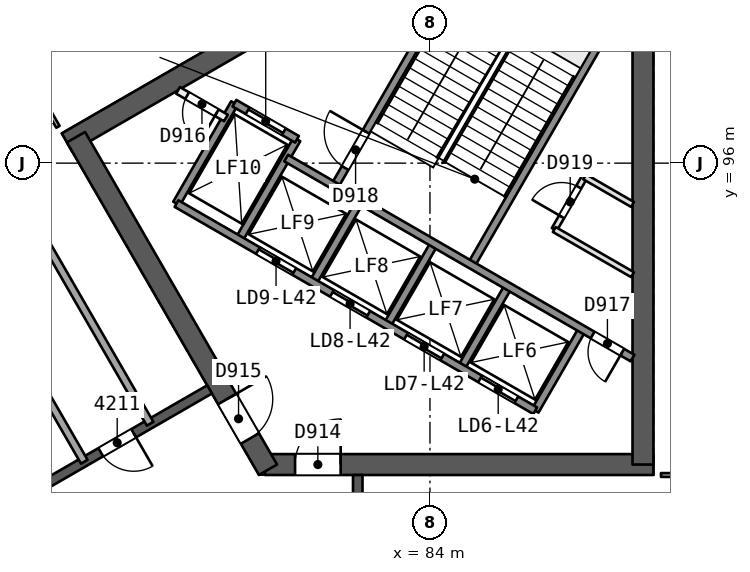
"""IFC4 building model, lengths in metres.
Left out: names, types, materials, properties, quantities, classifications, styles, units other than length and angle.
Written with IfcOpenShell. Run it as: python <this file> out.ifc"""

import sys

from ifc_helpers import new_model, si_unit, direction, frame, frame_2d, origin, place, context, subcontext, project, spatial, rectangle, extrude, element, fill, save


model = new_model("IFC4")
c1 = context("Model", 3, precision=1e-05, world=origin(), true_north=direction((0.0, 1.0)))
c2 = subcontext(c1, "Body", "Model", "MODEL_VIEW")
j1 = project(units=[si_unit("LENGTHUNIT", "METRE"), si_unit("PLANEANGLEUNIT", "RADIAN")], contexts=[c1])
p1 = place(None, origin())
s1 = spatial("IfcSite", under=j1, at=p1, CompositionType="ELEMENT")
p2 = place(p1, origin())
s2 = spatial("IfcBuilding", under=s1, at=p2, CompositionType="ELEMENT")
p3 = place(p2, frame((0.0, 0.0, 174.8)))
s3 = spatial("IfcBuildingStorey", under=s2, at=p3, CompositionType="ELEMENT", Elevation=174.8)
p4 = place(p3, frame((79.659, 88.069, 0.0), z_axis=(0.0, 0.0, 1.0), x_axis=(1.0, 0.0, 0.0)))
e1 = element("IfcWall", 1, at=p4, inside=s3, PredefinedType="SHEAR", context=c2, shape_type="SweptSolid", body=[
    extrude(rectangle(XDim=10.221, YDim=0.55, at=frame_2d((5.111, 0.0))), origin(), (0.0, 0.0, 1.0), 3.7),
])
p5 = place(p4, frame((0.791, 0.0, 0.0)))
e2 = element("IfcOpeningElement", 2, at=p5, cuts=e1, PredefinedType="OPENING", context=c2, shape_type="SweptSolid", body=[
    extrude(rectangle(XDim=1.2, YDim=2.1, at=frame_2d((0.6, 1.05))), frame((0.0, 0.286, 0.0), z_axis=(0.0, -1.0, 0.0), x_axis=(1.0, 0.0, 0.0)), (0.0, 0.0, 1.0), 0.571),
])
p6 = place(p3, frame((89.605, 88.069, 0.0), z_axis=(0.0, 0.0, 1.0), x_axis=(0.0, 1.0, 0.0)))
e3 = element("IfcWall", 3, at=p6, inside=s3, PredefinedType="SHEAR", context=c2, shape_type="SweptSolid", body=[
    extrude(rectangle(XDim=14.058, YDim=0.55, at=frame_2d((7.029, 0.0))), origin(), (0.0, 0.0, 1.0), 3.7),
])
p7 = place(p3, frame((86.723, 103.633, 0.0), z_axis=(0.0, 0.0, 1.0), x_axis=(-0.866023530946, -0.500003243837, 0.0)))
e4 = element("IfcWall", 4, at=p7, inside=s3, PredefinedType="SHEAR", context=c2, shape_type="SweptSolid", body=[
    extrude(rectangle(XDim=14.175, YDim=0.55, at=frame_2d((7.087, 0.0))), origin(), (0.0, 0.0, 1.0), 3.7),
])
p8 = place(p3, frame((74.686, 96.683, 0.0), z_axis=(0.0, 0.0, 1.0), x_axis=(0.499997818338, -0.866026663364, 0.0)))
e5 = element("IfcWall", 5, at=p8, inside=s3, PredefinedType="SHEAR", context=c2, shape_type="SweptSolid", body=[
    extrude(rectangle(XDim=10.105, YDim=0.55, at=frame_2d((5.052, 0.0))), origin(), (0.0, 0.0, 1.0), 3.7),
])
p9 = place(p8, frame((7.955, 0.0, 0.0)))
e6 = element("IfcOpeningElement", 6, at=p9, cuts=e5, PredefinedType="OPENING", context=c2, shape_type="SweptSolid", body=[
    extrude(rectangle(XDim=1.2, YDim=2.1, at=frame_2d((0.6, 1.05))), frame((0.0, 0.286, 0.0), z_axis=(0.0, -1.0, 0.0), x_axis=(1.0, 0.0, 0.0)), (0.0, 0.0, 1.0), 0.571),
])
p10 = place(p3, frame((82.1, 72.206, 0.0), z_axis=(0.0, 0.0, 1.0), x_axis=(0.0, 1.0, 0.0)))
e7 = element("IfcWall", 7, at=p10, inside=s3, PredefinedType="SHEAR", context=c2, shape_type="SweptSolid", body=[
    extrude(rectangle(XDim=15.588, YDim=0.25, at=frame_2d((7.794, 0.0))), origin(), (0.0, 0.0, 1.0), 3.25),
])
p11 = place(p10, frame((1.682, 0.0, 0.0)))
e8 = element("IfcOpeningElement", 8, at=p11, cuts=e7, PredefinedType="OPENING", context=c2, shape_type="SweptSolid", body=[
    extrude(rectangle(XDim=1.0, YDim=2.1, at=frame_2d((0.5, 1.05))), frame((0.0, 0.135, 0.0), z_axis=(0.0, -1.0, 0.0), x_axis=(1.0, 0.0, 0.0)), (0.0, 0.0, 1.0), 0.271),
])
p12 = place(p10, frame((8.75, 0.0, 0.0)))
e9 = element("IfcOpeningElement", 9, at=p12, cuts=e7, PredefinedType="OPENING", context=c2, shape_type="SweptSolid", body=[
    extrude(rectangle(XDim=1.0, YDim=2.1, at=frame_2d((0.5, 1.05))), frame((0.0, 0.135, 0.0), z_axis=(0.0, -1.0, 0.0), x_axis=(1.0, 0.0, 0.0)), (0.0, 0.0, 1.0), 0.271),
])
p13 = place(p10, frame((13.062, 0.0, 0.0)))
e10 = element("IfcOpeningElement", 10, at=p13, cuts=e7, PredefinedType="OPENING", context=c2, shape_type="SweptSolid", body=[
    extrude(rectangle(XDim=1.0, YDim=2.1, at=frame_2d((0.5, 1.05))), frame((0.0, 0.135, 0.0), z_axis=(0.0, -1.0, 0.0), x_axis=(1.0, 0.0, 0.0)), (0.0, 0.0, 1.0), 0.271),
])
p14 = place(p3, frame((78.2, 90.046, 0.0), z_axis=(0.0, 0.0, 1.0), x_axis=(-0.866026492143, -0.499998114903, 0.0)))
e11 = element("IfcWall", 11, at=p14, inside=s3, PredefinedType="SHEAR", context=c2, shape_type="SweptSolid", body=[
    extrude(rectangle(XDim=15.588, YDim=0.25, at=frame_2d((7.794, 0.0))), origin(), (0.0, 0.0, 1.0), 3.25),
])
p15 = place(p14, frame((2.306, 0.0, 0.0)))
e12 = element("IfcOpeningElement", 12, at=p15, cuts=e11, PredefinedType="OPENING", context=c2, shape_type="SweptSolid", body=[
    extrude(rectangle(XDim=1.0, YDim=2.1, at=frame_2d((0.5, 1.05))), frame((0.0, 0.135, 0.0), z_axis=(0.0, -1.0, 0.0), x_axis=(1.0, 0.0, 0.0)), (0.0, 0.0, 1.0), 0.271),
])
p16 = place(p14, frame((6.643, 0.0, 0.0)))
e13 = element("IfcOpeningElement", 13, at=p16, cuts=e11, PredefinedType="OPENING", context=c2, shape_type="SweptSolid", body=[
    extrude(rectangle(XDim=0.9, YDim=2.1, at=frame_2d((0.45, 1.05))), frame((0.0, 0.135, 0.0), z_axis=(0.0, -1.0, 0.0), x_axis=(1.0, 0.0, 0.0)), (0.0, 0.0, 1.0), 0.271),
])
p17 = place(p14, frame((9.604, 0.0, 0.0)))
e14 = element("IfcOpeningElement", 14, at=p17, cuts=e11, PredefinedType="OPENING", context=c2, shape_type="SweptSolid", body=[
    extrude(rectangle(XDim=0.9, YDim=2.1, at=frame_2d((0.45, 1.05))), frame((0.0, 0.135, 0.0), z_axis=(0.0, -1.0, 0.0), x_axis=(1.0, 0.0, 0.0)), (0.0, 0.0, 1.0), 0.271),
])
p18 = place(p14, frame((13.062, 0.0, 0.0)))
e15 = element("IfcOpeningElement", 15, at=p18, cuts=e11, PredefinedType="OPENING", context=c2, shape_type="SweptSolid", body=[
    extrude(rectangle(XDim=1.0, YDim=2.1, at=frame_2d((0.5, 1.05))), frame((0.0, 0.135, 0.0), z_axis=(0.0, -1.0, 0.0), x_axis=(1.0, 0.0, 0.0)), (0.0, 0.0, 1.0), 0.271),
])
p19 = place(p3, frame((93.428, 87.794, 0.0), z_axis=(0.0, 0.0, 1.0), x_axis=(-1.0, 0.0, 0.0)))
e16 = element("IfcWall", 16, at=p19, inside=s3, PredefinedType="PARTITIONING", context=c2, shape_type="SweptSolid", body=[
    extrude(rectangle(XDim=3.349, YDim=0.1, at=frame_2d((1.674, 0.0))), origin(), (0.0, 0.0, 1.0), 3.25),
])
p20 = place(p19, frame((1.224, 0.0, 0.0)))
e17 = element("IfcOpeningElement", 17, at=p20, cuts=e16, PredefinedType="OPENING", context=c2, shape_type="SweptSolid", body=[
    extrude(rectangle(XDim=0.9, YDim=2.1, at=frame_2d((0.45, 1.05))), frame((0.0, 0.061, 0.0), z_axis=(0.0, -1.0, 0.0), x_axis=(1.0, 0.0, 0.0)), (0.0, 0.0, 1.0), 0.121),
])
p21 = place(p3, frame((74.21, 96.956, 0.0), z_axis=(0.0, 0.0, 1.0), x_axis=(-0.499981198768, 0.866036258409, 0.0)))
e18 = element("IfcWall", 18, at=p21, inside=s3, PredefinedType="PARTITIONING", context=c2, shape_type="SweptSolid", body=[
    extrude(rectangle(XDim=3.349, YDim=0.1, at=frame_2d((1.674, 0.0))), origin(), (0.0, 0.0, 1.0), 3.25),
])
p22 = place(p21, frame((1.224, 0.0, 0.0)))
e19 = element("IfcOpeningElement", 19, at=p22, cuts=e18, PredefinedType="OPENING", context=c2, shape_type="SweptSolid", body=[
    extrude(rectangle(XDim=0.9, YDim=2.1, at=frame_2d((0.45, 1.05))), frame((0.0, 0.061, 0.0), z_axis=(0.0, -1.0, 0.0), x_axis=(1.0, 0.0, 0.0)), (0.0, 0.0, 1.0), 0.121),
])
p23 = place(p3, frame((74.904, 88.143, 0.0), z_axis=(0.0, 0.0, 1.0), x_axis=(-0.499990139034, 0.866031096941, 0.0)))
e20 = element("IfcWall", 20, at=p23, inside=s3, PredefinedType="PARTITIONING", context=c2, shape_type="SweptSolid", body=[
    extrude(rectangle(XDim=9.0, YDim=0.2, at=frame_2d((4.5, 0.0))), origin(), (0.0, 0.0, 1.0), 3.25),
])
p24 = place(p23, frame((4.05, 0.0, 0.0)))
e21 = element("IfcOpeningElement", 21, at=p24, cuts=e20, PredefinedType="OPENING", context=c2, shape_type="SweptSolid", body=[
    extrude(rectangle(XDim=0.9, YDim=2.1, at=frame_2d((0.45, 1.05))), frame((0.0, 0.11, 0.0), z_axis=(0.0, -1.0, 0.0), x_axis=(1.0, 0.0, 0.0)), (0.0, 0.0, 1.0), 0.221),
])
p25 = place(p3, frame((72.136, 96.937, 0.0), z_axis=(0.0, 0.0, 1.0), x_axis=(0.499990139034, -0.866031096941, 0.0)))
e22 = element("IfcWall", 22, at=p25, inside=s3, PredefinedType="PARTITIONING", context=c2, shape_type="SweptSolid", body=[
    extrude(rectangle(XDim=9.0, YDim=0.2, at=frame_2d((4.5, 0.0))), origin(), (0.0, 0.0, 1.0), 3.25),
])
p26 = place(p3, frame((42.58, 82.733, 0.0), z_axis=(0.0, 0.0, 1.0), x_axis=(0.866025382531, 0.500000036812, 0.0)))
e23 = element("IfcWall", 23, at=p26, inside=s3, PredefinedType="SOLIDWALL", context=c2, shape_type="SweptSolid", body=[
    extrude(rectangle(XDim=53.42, YDim=0.3, at=frame_2d((26.71, 0.0))), origin(), (0.0, 0.0, 1.0), 3.25),
])
p27 = place(p26, frame((30.499, 0.0, 0.0)))
e24 = element("IfcOpeningElement", 24, at=p27, cuts=e23, PredefinedType="OPENING", context=c2, shape_type="SweptSolid", body=[
    extrude(rectangle(XDim=2.4, YDim=2.4, at=frame_2d((1.2, 1.2))), frame((0.0, 0.161, 0.0), z_axis=(0.0, -1.0, 0.0), x_axis=(1.0, 0.0, 0.0)), (0.0, 0.0, 1.0), 0.321),
])
p28 = place(p26, frame((41.52, 0.0, 0.0)))
e25 = element("IfcOpeningElement", 25, at=p28, cuts=e23, PredefinedType="OPENING", context=c2, shape_type="SweptSolid", body=[
    extrude(rectangle(XDim=2.4, YDim=2.4, at=frame_2d((1.2, 1.2))), frame((0.0, 0.161, 0.0), z_axis=(0.0, -1.0, 0.0), x_axis=(1.0, 0.0, 0.0)), (0.0, 0.0, 1.0), 0.321),
])
p29 = place(p26, frame((19.742, 0.0, 0.0)))
e26 = element("IfcOpeningElement", 26, at=p29, cuts=e23, PredefinedType="OPENING", context=c2, shape_type="SweptSolid", body=[
    extrude(rectangle(XDim=2.4, YDim=2.4, at=frame_2d((1.2, 1.2))), frame((0.0, 0.161, 0.0), z_axis=(0.0, -1.0, 0.0), x_axis=(1.0, 0.0, 0.0)), (0.0, 0.0, 1.0), 0.321),
])
p30 = place(p26, frame((9.507, 0.0, 0.0)))
e27 = element("IfcOpeningElement", 27, at=p30, cuts=e23, PredefinedType="OPENING", context=c2, shape_type="SweptSolid", body=[
    extrude(rectangle(XDim=2.4, YDim=2.4, at=frame_2d((1.2, 1.2))), frame((0.0, 0.161, 0.0), z_axis=(0.0, -1.0, 0.0), x_axis=(1.0, 0.0, 0.0)), (0.0, 0.0, 1.0), 0.321),
])
p31 = place(p26, frame((26.512, 0.0, 0.9)))
e28 = element("IfcOpeningElement", 28, at=p31, cuts=e23, PredefinedType="OPENING", context=c2, shape_type="SweptSolid", body=[
    extrude(rectangle(XDim=1.8, YDim=1.5, at=frame_2d((0.9, 0.75))), frame((0.0, 0.161, 0.0), z_axis=(0.0, -1.0, 0.0), x_axis=(1.0, 0.0, 0.0)), (0.0, 0.0, 1.0), 0.321),
])
p32 = place(p26, frame((23.55, 0.0, 0.9)))
e29 = element("IfcOpeningElement", 29, at=p32, cuts=e23, PredefinedType="OPENING", context=c2, shape_type="SweptSolid", body=[
    extrude(rectangle(XDim=1.8, YDim=1.5, at=frame_2d((0.9, 0.75))), frame((0.0, 0.161, 0.0), z_axis=(0.0, -1.0, 0.0), x_axis=(1.0, 0.0, 0.0)), (0.0, 0.0, 1.0), 0.321),
])
p33 = place(p3, frame((86.77, 89.486, 0.0), z_axis=(0.0, 0.0, 1.0), x_axis=(0.499961042966, 0.86604789447, 0.0)))
e30 = element("IfcWall", 30, at=p33, inside=s3, PredefinedType="SOLIDWALL", context=c2, shape_type="SweptSolid", body=[
    extrude(rectangle(XDim=2.48, YDim=0.2, at=frame_2d((1.24, 0.0))), origin(), (0.0, 0.0, 1.0), 3.25),
])
p34 = place(p3, frame((87.271, 94.254, 0.0), z_axis=(0.0, 0.0, 1.0), x_axis=(0.499995408039, 0.866028054938, 0.0)))
e31 = element("IfcWall", 31, at=p34, inside=s3, PredefinedType="PARTITIONING", context=c2, shape_type="SweptSolid", body=[
    extrude(rectangle(XDim=1.6, YDim=0.15, at=frame_2d((0.8, 0.0))), origin(), (0.0, 0.0, 1.0), 3.25),
])
p35 = place(p34, frame((0.387, 0.0, 0.0)))
e32 = element("IfcOpeningElement", 32, at=p35, cuts=e31, PredefinedType="OPENING", context=c2, shape_type="SweptSolid", body=[
    extrude(rectangle(XDim=0.9, YDim=2.1, at=frame_2d((0.45, 1.05))), frame((0.0, 0.085, 0.0), z_axis=(0.0, -1.0, 0.0), x_axis=(1.0, 0.0, 0.0)), (0.0, 0.0, 1.0), 0.171),
])
p36 = place(p3, frame((84.821, 90.611, 0.0), z_axis=(0.0, 0.0, 1.0), x_axis=(0.499961042966, 0.86604789447, 0.0)))
e33 = element("IfcWall", 33, at=p36, inside=s3, PredefinedType="SOLIDWALL", context=c2, shape_type="SweptSolid", body=[
    extrude(rectangle(XDim=2.48, YDim=0.2, at=frame_2d((1.24, 0.0))), origin(), (0.0, 0.0, 1.0), 3.25),
])
p37 = place(p3, frame((85.087, 93.321, 0.0), z_axis=(0.0, 0.0, 1.0), x_axis=(0.500019787375, 0.866013979237, 0.0)))
e34 = element("IfcWall", 34, at=p37, inside=s3, PredefinedType="SOLIDWALL", context=c2, shape_type="SweptSolid", body=[
    extrude(rectangle(XDim=7.7, YDim=0.2, at=frame_2d((3.85, 0.0))), origin(), (0.0, 0.0, 1.0), 3.25),
])
for number, where, z_axis, x_axis in (
    (35, (82.873, 91.736, 0.0), (0.0, 0.0, 1.0), (0.5, 0.866, 0.0)),
    (36, (80.924, 92.861, 0.0), (0.0, 0.0, 1.0), (0.5, 0.866, 0.0)),
):
    element("IfcWall", number, at=place(p3, frame(where, z_axis=z_axis, x_axis=x_axis)), inside=s3, PredefinedType="SOLIDWALL", context=c2, shape_type="SweptSolid", body=[
        extrude(rectangle(XDim=2.48, YDim=0.2, at=frame_2d((1.24, 0.0))), origin(), (0.0, 0.0, 1.0), 3.25),
    ])
p38 = place(p3, frame((81.493, 95.396, 0.0), z_axis=(0.0, 0.0, 1.0), x_axis=(0.500006057782, 0.866021906294, 0.0)))
e37 = element("IfcWall", 37, at=p38, inside=s3, PredefinedType="SOLIDWALL", context=c2, shape_type="SweptSolid", body=[
    extrude(rectangle(XDim=7.7, YDim=0.2, at=frame_2d((3.85, 0.0))), origin(), (0.0, 0.0, 1.0), 3.25),
])
p39 = place(p38, frame((0.55, 0.0, 0.0)))
e38 = element("IfcOpeningElement", 38, at=p39, cuts=e37, PredefinedType="OPENING", context=c2, shape_type="SweptSolid", body=[
    extrude(rectangle(XDim=1.1, YDim=2.1, at=frame_2d((0.55, 1.05))), frame((0.0, 0.11, 0.0), z_axis=(0.0, -1.0, 0.0), x_axis=(1.0, 0.0, 0.0)), (0.0, 0.0, 1.0), 0.221),
])
for number, where, z_axis, x_axis in (
    (39, (78.976, 93.986, 0.0), (0.0, 0.0, 1.0), (0.5, 0.866, 0.0)),
    (40, (77.33, 94.936, 0.0), (0.0, 0.0, 1.0), (0.5, 0.866, 0.0)),
):
    element("IfcWall", number, at=place(p3, frame(where, z_axis=z_axis, x_axis=x_axis)), inside=s3, PredefinedType="SOLIDWALL", context=c2, shape_type="SweptSolid", body=[
        extrude(rectangle(XDim=3.05, YDim=0.2, at=frame_2d((1.525, 0.0))), origin(), (0.0, 0.0, 1.0), 3.25),
    ])
p40 = place(p3, frame((86.77, 89.486, 0.0), z_axis=(0.0, 0.0, 1.0), x_axis=(-0.86601811187, 0.500012629753, 0.0)))
e41 = element("IfcWall", 41, at=p40, inside=s3, PredefinedType="SOLIDWALL", context=c2, shape_type="SweptSolid", body=[
    extrude(rectangle(XDim=10.9, YDim=0.2, at=frame_2d((5.45, 0.0))), origin(), (0.0, 0.0, 1.0), 3.25),
])
p41 = place(p40, frame((0.575, 0.0, 0.0)))
e42 = element("IfcOpeningElement", 42, at=p41, cuts=e41, PredefinedType="OPENING", context=c2, shape_type="SweptSolid", body=[
    extrude(rectangle(XDim=1.1, YDim=2.1, at=frame_2d((0.55, 1.05))), frame((0.0, 0.11, 0.0), z_axis=(0.0, -1.0, 0.0), x_axis=(1.0, 0.0, 0.0)), (0.0, 0.0, 1.0), 0.221),
])
p42 = place(p40, frame((2.825, 0.0, 0.0)))
e43 = element("IfcOpeningElement", 43, at=p42, cuts=e41, PredefinedType="OPENING", context=c2, shape_type="SweptSolid", body=[
    extrude(rectangle(XDim=1.1, YDim=2.1, at=frame_2d((0.55, 1.05))), frame((0.0, 0.11, 0.0), z_axis=(0.0, -1.0, 0.0), x_axis=(1.0, 0.0, 0.0)), (0.0, 0.0, 1.0), 0.221),
])
p43 = place(p40, frame((5.075, 0.0, 0.0)))
e44 = element("IfcOpeningElement", 44, at=p43, cuts=e41, PredefinedType="OPENING", context=c2, shape_type="SweptSolid", body=[
    extrude(rectangle(XDim=1.1, YDim=2.1, at=frame_2d((0.55, 1.05))), frame((0.0, 0.11, 0.0), z_axis=(0.0, -1.0, 0.0), x_axis=(1.0, 0.0, 0.0)), (0.0, 0.0, 1.0), 0.221),
])
p44 = place(p40, frame((7.325, 0.0, 0.0)))
e45 = element("IfcOpeningElement", 45, at=p44, cuts=e41, PredefinedType="OPENING", context=c2, shape_type="SweptSolid", body=[
    extrude(rectangle(XDim=1.1, YDim=2.1, at=frame_2d((0.55, 1.05))), frame((0.0, 0.11, 0.0), z_axis=(0.0, -1.0, 0.0), x_axis=(1.0, 0.0, 0.0)), (0.0, 0.0, 1.0), 0.221),
])
p45 = place(p3, frame((89.33, 90.872, 0.0), z_axis=(0.0, 0.0, 1.0), x_axis=(-0.866027589512, 0.49999621419, 0.0)))
e46 = element("IfcWall", 46, at=p45, inside=s3, PredefinedType="SOLIDWALL", context=c2, shape_type="SweptSolid", body=[
    extrude(rectangle(XDim=10.524, YDim=0.2, at=frame_2d((5.262, 0.0))), origin(), (0.0, 0.0, 1.0), 3.25),
])
p46 = place(p45, frame((0.312, 0.0, 0.0)))
e47 = element("IfcOpeningElement", 47, at=p46, cuts=e46, PredefinedType="OPENING", context=c2, shape_type="SweptSolid", body=[
    extrude(rectangle(XDim=0.9, YDim=2.1, at=frame_2d((0.45, 1.05))), frame((0.0, 0.11, 0.0), z_axis=(0.0, -1.0, 0.0), x_axis=(1.0, 0.0, 0.0)), (0.0, 0.0, 1.0), 0.221),
])
p47 = place(p3, frame((78.63, 97.188, 0.0), z_axis=(0.0, 0.0, 1.0), x_axis=(-0.866003949776, 0.500037157592, 0.0)))
e48 = element("IfcWall", 48, at=p47, inside=s3, PredefinedType="PARTITIONING", context=c2, shape_type="SweptSolid", body=[
    extrude(rectangle(XDim=1.455, YDim=0.2, at=frame_2d((0.728, 0.0))), origin(), (0.0, 0.0, 1.0), 3.25),
])
p48 = place(p47, frame((0.278, 0.0, 0.0)))
e49 = element("IfcOpeningElement", 49, at=p48, cuts=e48, PredefinedType="OPENING", context=c2, shape_type="SweptSolid", body=[
    extrude(rectangle(XDim=0.9, YDim=2.1, at=frame_2d((0.45, 1.05))), frame((0.0, 0.11, 0.0), z_axis=(0.0, -1.0, 0.0), x_axis=(1.0, 0.0, 0.0)), (0.0, 0.0, 1.0), 0.221),
])
p49 = place(p3, frame((80.5, 96.627, 0.0), z_axis=(0.0, 0.0, 1.0), x_axis=(-0.86601224135, 0.500022797313, 0.0)))
e50 = element("IfcWall", 50, at=p49, inside=s3, PredefinedType="SOLIDWALL", context=c2, shape_type="SweptSolid", body=[
    extrude(rectangle(XDim=1.9, YDim=0.2, at=frame_2d((0.95, 0.0))), origin(), (0.0, 0.0, 1.0), 3.25),
])
p50 = place(p49, frame((0.4, 0.0, 0.0)))
e51 = element("IfcOpeningElement", 51, at=p50, cuts=e50, PredefinedType="OPENING", context=c2, shape_type="SweptSolid", body=[
    extrude(rectangle(XDim=1.1, YDim=2.1, at=frame_2d((0.55, 1.05))), frame((0.0, 0.11, 0.0), z_axis=(0.0, -1.0, 0.0), x_axis=(1.0, 0.0, 0.0)), (0.0, 0.0, 1.0), 0.221),
])
p51 = place(p3, frame((89.33, 93.065, 0.0), z_axis=(0.0, 0.0, 1.0), x_axis=(-0.866041951395, 0.499971337603, 0.0)))
e52 = element("IfcWall", 52, at=p51, inside=s3, PredefinedType="PARTITIONING", context=c2, shape_type="SweptSolid", body=[
    extrude(rectangle(XDim=2.378, YDim=0.15, at=frame_2d((1.189, 0.0))), origin(), (0.0, 0.0, 1.0), 3.25),
])
p52 = place(p3, frame((89.33, 94.913, 0.0), z_axis=(0.0, 0.0, 1.0), x_axis=(-0.865981433661, 0.500076150755, 0.0)))
e53 = element("IfcWall", 53, at=p52, inside=s3, PredefinedType="PARTITIONING", context=c2, shape_type="SweptSolid", body=[
    extrude(rectangle(XDim=1.454, YDim=0.15, at=frame_2d((0.727, 0.0))), origin(), (0.0, 0.0, 1.0), 3.25),
])
p53 = place(p15, origin())
e54 = element("IfcDoor", 54, at=p53, inside=s3, OperationType="SINGLE_SWING_LEFT", PredefinedType="NOTDEFINED", context=c2, shape_type="SweptSolid", body=[
    extrude(rectangle(XDim=1.0, YDim=2.1, at=frame_2d((0.5, 1.05))), frame((0.0, 0.025, 0.0), z_axis=(0.0, -1.0, 0.0), x_axis=(1.0, 0.0, 0.0)), (0.0, 0.0, 1.0), 0.05),
])
fill(e12, e54)
p54 = place(p5, origin())
e55 = element("IfcDoor", 55, at=p54, inside=s3, OperationType="SINGLE_SWING_RIGHT", PredefinedType="NOTDEFINED", context=c2, shape_type="SweptSolid", body=[
    extrude(rectangle(XDim=1.2, YDim=2.1, at=frame_2d((0.6, 1.05))), frame((0.0, 0.025, 0.0), z_axis=(0.0, -1.0, 0.0), x_axis=(1.0, 0.0, 0.0)), (0.0, 0.0, 1.0), 0.05),
])
fill(e2, e55)
p55 = place(p9, origin())
e56 = element("IfcDoor", 56, at=p55, inside=s3, OperationType="SINGLE_SWING_LEFT", PredefinedType="NOTDEFINED", context=c2, shape_type="SweptSolid", body=[
    extrude(rectangle(XDim=1.2, YDim=2.1, at=frame_2d((0.6, 1.05))), frame((0.0, 0.025, 0.0), z_axis=(0.0, -1.0, 0.0), x_axis=(1.0, 0.0, 0.0)), (0.0, 0.0, 1.0), 0.05),
])
fill(e6, e56)
p56 = place(p41, origin())
e57 = element("IfcDoor", 57, at=p56, inside=s3, OperationType="SLIDING_TO_RIGHT", PredefinedType="NOTDEFINED", context=c2, shape_type="SweptSolid", body=[
    extrude(rectangle(XDim=1.1, YDim=2.1, at=frame_2d((0.55, 1.05))), frame((0.0, 0.025, 0.0), z_axis=(0.0, -1.0, 0.0), x_axis=(1.0, 0.0, 0.0)), (0.0, 0.0, 1.0), 0.05),
])
fill(e42, e57)
p57 = place(p42, origin())
e58 = element("IfcDoor", 58, at=p57, inside=s3, OperationType="SLIDING_TO_LEFT", PredefinedType="NOTDEFINED", context=c2, shape_type="SweptSolid", body=[
    extrude(rectangle(XDim=1.1, YDim=2.1, at=frame_2d((0.55, 1.05))), frame((0.0, 0.025, 0.0), z_axis=(0.0, -1.0, 0.0), x_axis=(1.0, 0.0, 0.0)), (0.0, 0.0, 1.0), 0.05),
])
fill(e43, e58)
p58 = place(p43, origin())
e59 = element("IfcDoor", 59, at=p58, inside=s3, OperationType="SLIDING_TO_RIGHT", PredefinedType="NOTDEFINED", context=c2, shape_type="SweptSolid", body=[
    extrude(rectangle(XDim=1.1, YDim=2.1, at=frame_2d((0.55, 1.05))), frame((0.0, 0.025, 0.0), z_axis=(0.0, -1.0, 0.0), x_axis=(1.0, 0.0, 0.0)), (0.0, 0.0, 1.0), 0.05),
])
fill(e44, e59)
p59 = place(p44, origin())
e60 = element("IfcDoor", 60, at=p59, inside=s3, OperationType="SLIDING_TO_LEFT", PredefinedType="NOTDEFINED", context=c2, shape_type="SweptSolid", body=[
    extrude(rectangle(XDim=1.1, YDim=2.1, at=frame_2d((0.55, 1.05))), frame((0.0, 0.025, 0.0), z_axis=(0.0, -1.0, 0.0), x_axis=(1.0, 0.0, 0.0)), (0.0, 0.0, 1.0), 0.05),
])
fill(e45, e60)
p60 = place(p50, origin())
e61 = element("IfcDoor", 61, at=p60, inside=s3, OperationType="SLIDING_TO_RIGHT", PredefinedType="NOTDEFINED", context=c2, shape_type="SweptSolid", body=[
    extrude(rectangle(XDim=1.1, YDim=2.1, at=frame_2d((0.55, 1.05))), frame((0.0, 0.025, 0.0), z_axis=(0.0, -1.0, 0.0), x_axis=(1.0, 0.0, 0.0)), (0.0, 0.0, 1.0), 0.05),
])
fill(e51, e61)
p61 = place(p48, origin())
e62 = element("IfcDoor", 62, at=p61, inside=s3, OperationType="SINGLE_SWING_LEFT", PredefinedType="NOTDEFINED", context=c2, shape_type="SweptSolid", body=[
    extrude(rectangle(XDim=0.9, YDim=2.1, at=frame_2d((0.45, 1.05))), frame((0.0, 0.025, 0.0), z_axis=(0.0, -1.0, 0.0), x_axis=(1.0, 0.0, 0.0)), (0.0, 0.0, 1.0), 0.05),
])
fill(e49, e62)
p62 = place(p46, origin())
e63 = element("IfcDoor", 63, at=p62, inside=s3, OperationType="SINGLE_SWING_LEFT", PredefinedType="NOTDEFINED", context=c2, shape_type="SweptSolid", body=[
    extrude(rectangle(XDim=0.9, YDim=2.1, at=frame_2d((0.45, 1.05))), frame((0.0, 0.025, 0.0), z_axis=(0.0, -1.0, 0.0), x_axis=(1.0, 0.0, 0.0)), (0.0, 0.0, 1.0), 0.05),
])
fill(e47, e63)
p63 = place(p39, origin())
e64 = element("IfcDoor", 64, at=p63, inside=s3, OperationType="SINGLE_SWING_RIGHT", PredefinedType="NOTDEFINED", context=c2, shape_type="SweptSolid", body=[
    extrude(rectangle(XDim=1.1, YDim=2.1, at=frame_2d((0.55, 1.05))), frame((0.0, 0.025, 0.0), z_axis=(0.0, -1.0, 0.0), x_axis=(1.0, 0.0, 0.0)), (0.0, 0.0, 1.0), 0.05),
])
fill(e38, e64)
p64 = place(p35, origin())
e65 = element("IfcDoor", 65, at=p64, inside=s3, OperationType="SINGLE_SWING_LEFT", PredefinedType="NOTDEFINED", context=c2, shape_type="SweptSolid", body=[
    extrude(rectangle(XDim=0.9, YDim=2.1, at=frame_2d((0.45, 1.05))), frame((0.0, 0.025, 0.0), z_axis=(0.0, -1.0, 0.0), x_axis=(1.0, 0.0, 0.0)), (0.0, 0.0, 1.0), 0.05),
])
fill(e32, e65)
save(model, sys.argv[1])
